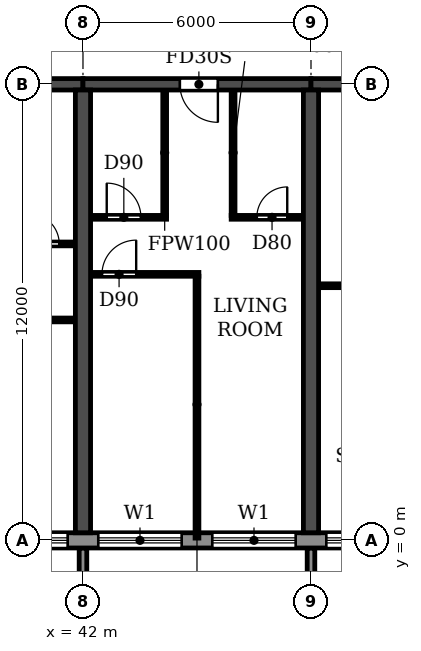
"""IFC4 building model, lengths in metres.
Left out: names, types, materials, properties, quantities, classifications, styles, units other than length and angle.
Written with IfcOpenShell. Run it as: python <this file> out.ifc"""

import sys

from ifc_helpers import new_model, si_unit, direction, frame, frame_2d, origin, place, context, subcontext, project, spatial, polyline, rectangle, outline, extrude, source, transform, mapped, element, fill, save


model = new_model("IFC4")
c1 = context("Model", 3, precision=1e-05, world=origin(), true_north=direction((0.0, 1.0)))
c2 = subcontext(c1, "Body", "Model", "MODEL_VIEW")
j1 = project(units=[si_unit("LENGTHUNIT", "METRE"), si_unit("PLANEANGLEUNIT", "RADIAN")], contexts=[c1])
p1 = place(None, origin())
s1 = spatial("IfcSite", under=j1, at=p1, CompositionType="ELEMENT")
p2 = place(p1, origin())
s2 = spatial("IfcBuilding", under=s1, at=p2, CompositionType="ELEMENT")
p3 = place(p2, frame((0.0, 0.0, 63.0)))
s3 = spatial("IfcBuildingStorey", under=s2, at=p3, CompositionType="ELEMENT", Elevation=63.0)
for number, where, z_axis, x_axis in (
    (1, (42.0, 0.2, 0.0), (0.0, 0.0, 1.0), (0.0, 1.0, 0.0)),
    (2, (48.0, 0.2, 0.0), (0.0, 0.0, 1.0), (0.0, 1.0, 0.0)),
):
    element("IfcWall", number, at=place(p3, frame(where, z_axis=z_axis, x_axis=x_axis)), inside=s3, PredefinedType="SHEAR", context=c2, shape_type="SweptSolid", body=[
        extrude(rectangle(XDim=11.65, YDim=0.4, at=frame_2d((5.825, 0.0))), origin(), (0.0, 0.0, 1.0), 2.95),
    ])
p4 = place(p3, frame((36.0, 12.0, 0.0), z_axis=(0.0, 0.0, 1.0), x_axis=(1.0, 0.0, 0.0)))
e3 = element("IfcWall", 3, at=p4, inside=s3, PredefinedType="SHEAR", context=c2, shape_type="SweptSolid", body=[
    extrude(rectangle(XDim=6.0, YDim=0.3, at=frame_2d((3.0, 0.0))), origin(), (0.0, 0.0, 1.0), 2.35),
])
p5 = place(p4, frame((2.55, 0.0, 0.0)))
e4 = element("IfcOpeningElement", 4, at=p5, cuts=e3, PredefinedType="OPENING", context=c2, shape_type="SweptSolid", body=[
    extrude(rectangle(XDim=1.0, YDim=2.1, at=frame_2d((0.5, 1.05))), frame((0.0, 0.16, 0.0), z_axis=(0.0, -1.0, 0.0), x_axis=(1.0, 0.0, 0.0)), (0.0, 0.0, 1.0), 0.32),
])
p6 = place(p3, frame((42.0, 12.0, 0.0), z_axis=(0.0, 0.0, 1.0), x_axis=(1.0, 0.0, 0.0)))
e5 = element("IfcWall", 5, at=p6, inside=s3, PredefinedType="SHEAR", context=c2, shape_type="SweptSolid", body=[
    extrude(rectangle(XDim=6.0, YDim=0.3, at=frame_2d((3.0, 0.0))), origin(), (0.0, 0.0, 1.0), 2.35),
])
p7 = place(p6, frame((2.55, 0.0, 0.0)))
e6 = element("IfcOpeningElement", 6, at=p7, cuts=e5, PredefinedType="OPENING", context=c2, shape_type="SweptSolid", body=[
    extrude(rectangle(XDim=1.0, YDim=2.1, at=frame_2d((0.5, 1.05))), frame((0.0, 0.16, 0.0), z_axis=(0.0, -1.0, 0.0), x_axis=(1.0, 0.0, 0.0)), (0.0, 0.0, 1.0), 0.32),
])
p8 = place(p3, frame((48.0, 12.0, 0.0), z_axis=(0.0, 0.0, 1.0), x_axis=(1.0, 0.0, 0.0)))
e7 = element("IfcWall", 7, at=p8, inside=s3, PredefinedType="SHEAR", context=c2, shape_type="SweptSolid", body=[
    extrude(rectangle(XDim=6.0, YDim=0.3, at=frame_2d((3.0, 0.0))), origin(), (0.0, 0.0, 1.0), 2.35),
])
p9 = place(p8, frame((2.45, 0.0, 0.0)))
e8 = element("IfcOpeningElement", 8, at=p9, cuts=e7, PredefinedType="OPENING", context=c2, shape_type="SweptSolid", body=[
    extrude(rectangle(XDim=1.0, YDim=2.1, at=frame_2d((0.5, 1.05))), frame((0.0, 0.16, 0.0), z_axis=(0.0, -1.0, 0.0), x_axis=(1.0, 0.0, 0.0)), (0.0, 0.0, 1.0), 0.32),
])
p10 = place(p3, frame((10.683, 0.0, 0.0), z_axis=(0.0, 0.0, 1.0), x_axis=(1.0, 0.0, 0.0)))
e9 = element("IfcWall", 9, at=p10, inside=s3, PredefinedType="STANDARD", context=c2, shape_type="SweptSolid", body=[
    extrude(rectangle(XDim=80.634, YDim=0.4, at=frame_2d((40.317, 0.0))), origin(), (0.0, 0.0, 1.0), 2.95),
])
p11 = place(p10, frame((1.717, 0.0, 0.9)))
e10 = element("IfcOpeningElement", 10, at=p11, cuts=e9, PredefinedType="OPENING", context=c2, shape_type="SweptSolid", body=[
    extrude(rectangle(XDim=2.2, YDim=1.5, at=frame_2d((1.1, 0.75))), frame((0.0, 0.21, 0.0), z_axis=(0.0, -1.0, 0.0), x_axis=(1.0, 0.0, 0.0)), (0.0, 0.0, 1.0), 0.42),
])
p12 = place(p10, frame((4.917, 0.0, 0.0)))
e11 = element("IfcOpeningElement", 11, at=p12, cuts=e9, PredefinedType="OPENING", context=c2, shape_type="SweptSolid", body=[
    extrude(rectangle(XDim=1.8, YDim=2.4, at=frame_2d((0.9, 1.2))), frame((0.0, 0.21, 0.0), z_axis=(0.0, -1.0, 0.0), x_axis=(1.0, 0.0, 0.0)), (0.0, 0.0, 1.0), 0.42),
])
p13 = place(p10, frame((7.717, 0.0, 0.9)))
e12 = element("IfcOpeningElement", 12, at=p13, cuts=e9, PredefinedType="OPENING", context=c2, shape_type="SweptSolid", body=[
    extrude(rectangle(XDim=2.2, YDim=1.5, at=frame_2d((1.1, 0.75))), frame((0.0, 0.21, 0.0), z_axis=(0.0, -1.0, 0.0), x_axis=(1.0, 0.0, 0.0)), (0.0, 0.0, 1.0), 0.42),
])
p14 = place(p10, frame((10.717, 0.0, 0.9)))
e13 = element("IfcOpeningElement", 13, at=p14, cuts=e9, PredefinedType="OPENING", context=c2, shape_type="SweptSolid", body=[
    extrude(rectangle(XDim=2.2, YDim=1.5, at=frame_2d((1.1, 0.75))), frame((0.0, 0.21, 0.0), z_axis=(0.0, -1.0, 0.0), x_axis=(1.0, 0.0, 0.0)), (0.0, 0.0, 1.0), 0.42),
])
p15 = place(p10, frame((13.717, 0.0, 0.9)))
e14 = element("IfcOpeningElement", 14, at=p15, cuts=e9, PredefinedType="OPENING", context=c2, shape_type="SweptSolid", body=[
    extrude(rectangle(XDim=2.2, YDim=1.5, at=frame_2d((1.1, 0.75))), frame((0.0, 0.21, 0.0), z_axis=(0.0, -1.0, 0.0), x_axis=(1.0, 0.0, 0.0)), (0.0, 0.0, 1.0), 0.42),
])
p16 = place(p10, frame((16.917, 0.0, 0.0)))
e15 = element("IfcOpeningElement", 15, at=p16, cuts=e9, PredefinedType="OPENING", context=c2, shape_type="SweptSolid", body=[
    extrude(rectangle(XDim=1.8, YDim=2.4, at=frame_2d((0.9, 1.2))), frame((0.0, 0.21, 0.0), z_axis=(0.0, -1.0, 0.0), x_axis=(1.0, 0.0, 0.0)), (0.0, 0.0, 1.0), 0.42),
])
p17 = place(p10, frame((19.717, 0.0, 0.9)))
e16 = element("IfcOpeningElement", 16, at=p17, cuts=e9, PredefinedType="OPENING", context=c2, shape_type="SweptSolid", body=[
    extrude(rectangle(XDim=2.2, YDim=1.5, at=frame_2d((1.1, 0.75))), frame((0.0, 0.21, 0.0), z_axis=(0.0, -1.0, 0.0), x_axis=(1.0, 0.0, 0.0)), (0.0, 0.0, 1.0), 0.42),
])
p18 = place(p10, frame((22.717, 0.0, 0.9)))
e17 = element("IfcOpeningElement", 17, at=p18, cuts=e9, PredefinedType="OPENING", context=c2, shape_type="SweptSolid", body=[
    extrude(rectangle(XDim=2.2, YDim=1.5, at=frame_2d((1.1, 0.75))), frame((0.0, 0.21, 0.0), z_axis=(0.0, -1.0, 0.0), x_axis=(1.0, 0.0, 0.0)), (0.0, 0.0, 1.0), 0.42),
])
p19 = place(p10, frame((25.917, 0.0, 0.0)))
e18 = element("IfcOpeningElement", 18, at=p19, cuts=e9, PredefinedType="OPENING", context=c2, shape_type="SweptSolid", body=[
    extrude(rectangle(XDim=1.8, YDim=2.4, at=frame_2d((0.9, 1.2))), frame((0.0, 0.21, 0.0), z_axis=(0.0, -1.0, 0.0), x_axis=(1.0, 0.0, 0.0)), (0.0, 0.0, 1.0), 0.42),
])
p20 = place(p10, frame((28.717, 0.0, 0.9)))
e19 = element("IfcOpeningElement", 19, at=p20, cuts=e9, PredefinedType="OPENING", context=c2, shape_type="SweptSolid", body=[
    extrude(rectangle(XDim=2.2, YDim=1.5, at=frame_2d((1.1, 0.75))), frame((0.0, 0.21, 0.0), z_axis=(0.0, -1.0, 0.0), x_axis=(1.0, 0.0, 0.0)), (0.0, 0.0, 1.0), 0.42),
])
p21 = place(p10, frame((31.717, 0.0, 0.9)))
e20 = element("IfcOpeningElement", 20, at=p21, cuts=e9, PredefinedType="OPENING", context=c2, shape_type="SweptSolid", body=[
    extrude(rectangle(XDim=2.2, YDim=1.5, at=frame_2d((1.1, 0.75))), frame((0.0, 0.21, 0.0), z_axis=(0.0, -1.0, 0.0), x_axis=(1.0, 0.0, 0.0)), (0.0, 0.0, 1.0), 0.42),
])
p22 = place(p10, frame((34.717, 0.0, 0.9)))
e21 = element("IfcOpeningElement", 21, at=p22, cuts=e9, PredefinedType="OPENING", context=c2, shape_type="SweptSolid", body=[
    extrude(rectangle(XDim=2.2, YDim=1.5, at=frame_2d((1.1, 0.75))), frame((0.0, 0.21, 0.0), z_axis=(0.0, -1.0, 0.0), x_axis=(1.0, 0.0, 0.0)), (0.0, 0.0, 1.0), 0.42),
])
p23 = place(p10, frame((37.717, 0.0, 0.9)))
e22 = element("IfcOpeningElement", 22, at=p23, cuts=e9, PredefinedType="OPENING", context=c2, shape_type="SweptSolid", body=[
    extrude(rectangle(XDim=2.2, YDim=1.5, at=frame_2d((1.1, 0.75))), frame((0.0, 0.21, 0.0), z_axis=(0.0, -1.0, 0.0), x_axis=(1.0, 0.0, 0.0)), (0.0, 0.0, 1.0), 0.42),
])
p24 = place(p10, frame((40.917, 0.0, 0.0)))
e23 = element("IfcOpeningElement", 23, at=p24, cuts=e9, PredefinedType="OPENING", context=c2, shape_type="SweptSolid", body=[
    extrude(rectangle(XDim=1.8, YDim=2.4, at=frame_2d((0.9, 1.2))), frame((0.0, 0.21, 0.0), z_axis=(0.0, -1.0, 0.0), x_axis=(1.0, 0.0, 0.0)), (0.0, 0.0, 1.0), 0.42),
])
p25 = place(p10, frame((43.717, 0.0, 0.9)))
e24 = element("IfcOpeningElement", 24, at=p25, cuts=e9, PredefinedType="OPENING", context=c2, shape_type="SweptSolid", body=[
    extrude(rectangle(XDim=2.2, YDim=1.5, at=frame_2d((1.1, 0.75))), frame((0.0, 0.21, 0.0), z_axis=(0.0, -1.0, 0.0), x_axis=(1.0, 0.0, 0.0)), (0.0, 0.0, 1.0), 0.42),
])
p26 = place(p10, frame((46.717, 0.0, 0.9)))
e25 = element("IfcOpeningElement", 25, at=p26, cuts=e9, PredefinedType="OPENING", context=c2, shape_type="SweptSolid", body=[
    extrude(rectangle(XDim=2.2, YDim=1.5, at=frame_2d((1.1, 0.75))), frame((0.0, 0.21, 0.0), z_axis=(0.0, -1.0, 0.0), x_axis=(1.0, 0.0, 0.0)), (0.0, 0.0, 1.0), 0.42),
])
p27 = place(p10, frame((49.717, 0.0, 0.9)))
e26 = element("IfcOpeningElement", 26, at=p27, cuts=e9, PredefinedType="OPENING", context=c2, shape_type="SweptSolid", body=[
    extrude(rectangle(XDim=2.2, YDim=1.5, at=frame_2d((1.1, 0.75))), frame((0.0, 0.21, 0.0), z_axis=(0.0, -1.0, 0.0), x_axis=(1.0, 0.0, 0.0)), (0.0, 0.0, 1.0), 0.42),
])
p28 = place(p10, frame((52.717, 0.0, 0.9)))
e27 = element("IfcOpeningElement", 27, at=p28, cuts=e9, PredefinedType="OPENING", context=c2, shape_type="SweptSolid", body=[
    extrude(rectangle(XDim=2.2, YDim=1.5, at=frame_2d((1.1, 0.75))), frame((0.0, 0.21, 0.0), z_axis=(0.0, -1.0, 0.0), x_axis=(1.0, 0.0, 0.0)), (0.0, 0.0, 1.0), 0.42),
])
p29 = place(p10, frame((55.717, 0.0, 0.9)))
e28 = element("IfcOpeningElement", 28, at=p29, cuts=e9, PredefinedType="OPENING", context=c2, shape_type="SweptSolid", body=[
    extrude(rectangle(XDim=2.2, YDim=1.5, at=frame_2d((1.1, 0.75))), frame((0.0, 0.21, 0.0), z_axis=(0.0, -1.0, 0.0), x_axis=(1.0, 0.0, 0.0)), (0.0, 0.0, 1.0), 0.42),
])
p30 = place(p10, frame((58.717, 0.0, 0.9)))
e29 = element("IfcOpeningElement", 29, at=p30, cuts=e9, PredefinedType="OPENING", context=c2, shape_type="SweptSolid", body=[
    extrude(rectangle(XDim=2.2, YDim=1.5, at=frame_2d((1.1, 0.75))), frame((0.0, 0.21, 0.0), z_axis=(0.0, -1.0, 0.0), x_axis=(1.0, 0.0, 0.0)), (0.0, 0.0, 1.0), 0.42),
])
p31 = place(p10, frame((61.717, 0.0, 0.9)))
e30 = element("IfcOpeningElement", 30, at=p31, cuts=e9, PredefinedType="OPENING", context=c2, shape_type="SweptSolid", body=[
    extrude(rectangle(XDim=2.2, YDim=1.5, at=frame_2d((1.1, 0.75))), frame((0.0, 0.21, 0.0), z_axis=(0.0, -1.0, 0.0), x_axis=(1.0, 0.0, 0.0)), (0.0, 0.0, 1.0), 0.42),
])
p32 = place(p10, frame((64.917, 0.0, 0.0)))
e31 = element("IfcOpeningElement", 31, at=p32, cuts=e9, PredefinedType="OPENING", context=c2, shape_type="SweptSolid", body=[
    extrude(rectangle(XDim=1.8, YDim=2.4, at=frame_2d((0.9, 1.2))), frame((0.0, 0.21, 0.0), z_axis=(0.0, -1.0, 0.0), x_axis=(1.0, 0.0, 0.0)), (0.0, 0.0, 1.0), 0.42),
])
p33 = place(p10, frame((67.717, 0.0, 0.9)))
e32 = element("IfcOpeningElement", 32, at=p33, cuts=e9, PredefinedType="OPENING", context=c2, shape_type="SweptSolid", body=[
    extrude(rectangle(XDim=2.2, YDim=1.5, at=frame_2d((1.1, 0.75))), frame((0.0, 0.21, 0.0), z_axis=(0.0, -1.0, 0.0), x_axis=(1.0, 0.0, 0.0)), (0.0, 0.0, 1.0), 0.42),
])
p34 = place(p10, frame((70.717, 0.0, 0.9)))
e33 = element("IfcOpeningElement", 33, at=p34, cuts=e9, PredefinedType="OPENING", context=c2, shape_type="SweptSolid", body=[
    extrude(rectangle(XDim=2.2, YDim=1.5, at=frame_2d((1.1, 0.75))), frame((0.0, 0.21, 0.0), z_axis=(0.0, -1.0, 0.0), x_axis=(1.0, 0.0, 0.0)), (0.0, 0.0, 1.0), 0.42),
])
p35 = place(p10, frame((73.717, 0.0, 0.9)))
e34 = element("IfcOpeningElement", 34, at=p35, cuts=e9, PredefinedType="OPENING", context=c2, shape_type="SweptSolid", body=[
    extrude(rectangle(XDim=2.2, YDim=1.5, at=frame_2d((1.1, 0.75))), frame((0.0, 0.21, 0.0), z_axis=(0.0, -1.0, 0.0), x_axis=(1.0, 0.0, 0.0)), (0.0, 0.0, 1.0), 0.42),
])
p36 = place(p10, frame((76.917, 0.0, 0.0)))
e35 = element("IfcOpeningElement", 35, at=p36, cuts=e9, PredefinedType="OPENING", context=c2, shape_type="SweptSolid", body=[
    extrude(rectangle(XDim=1.8, YDim=2.4, at=frame_2d((0.9, 1.2))), frame((0.0, 0.21, 0.0), z_axis=(0.0, -1.0, 0.0), x_axis=(1.0, 0.0, 0.0)), (0.0, 0.0, 1.0), 0.42),
])
m1 = source(origin(), c2, "Body", "SweptSolid", [
    extrude(outline(polyline([(0.0, 0.0), (0.2, 0.0), (0.2, 1.65), (0.0, 1.65), (0.0, 0.0)])), origin(), (0.0, 0.0, 1.0), 3.1),
])
for number, where in (
    (36, (41.9, -1.85, 0.0)),
    (37, (47.9, -1.85, 0.0)),
):
    element("IfcWall", number, at=place(p3, frame(where)), inside=s3, PredefinedType="STANDARD", context=c2, shape_type="MappedRepresentation", body=[
        mapped(m1, transform((0.0, 0.0, 0.0))),
    ])
p37 = place(p3, frame((38.95, 5.8, 0.0), z_axis=(0.0, 0.0, 1.0), x_axis=(1.0, 0.0, 0.0)))
e38 = element("IfcWall", 38, at=p37, inside=s3, PredefinedType="PARTITIONING", context=c2, shape_type="SweptSolid", body=[
    extrude(rectangle(XDim=2.84, YDim=0.1, at=frame_2d((1.42, 0.0))), origin(), (0.0, 0.0, 1.0), 2.95),
])
p38 = place(p37, frame((0.55, 0.0, 0.0)))
e39 = element("IfcOpeningElement", 39, at=p38, cuts=e38, PredefinedType="OPENING", context=c2, shape_type="SweptSolid", body=[
    extrude(rectangle(XDim=0.9, YDim=2.1, at=frame_2d((0.45, 1.05))), frame((0.0, 0.06, 0.0), z_axis=(0.0, -1.0, 0.0), x_axis=(1.0, 0.0, 0.0)), (0.0, 0.0, 1.0), 0.12),
])
p39 = place(p3, frame((48.21, 6.7, 0.0), z_axis=(0.0, 0.0, 1.0), x_axis=(1.0, 0.0, 0.0)))
e40 = element("IfcWall", 40, at=p39, inside=s3, PredefinedType="PARTITIONING", context=c2, shape_type="SweptSolid", body=[
    extrude(rectangle(XDim=1.89, YDim=0.1, at=frame_2d((0.945, 0.0))), origin(), (0.0, 0.0, 1.0), 2.95),
])
p40 = place(p3, frame((42.21, 7.0, 0.0), z_axis=(0.0, 0.0, 1.0), x_axis=(1.0, 0.0, 0.0)))
e41 = element("IfcWall", 41, at=p40, inside=s3, PredefinedType="PARTITIONING", context=c2, shape_type="SweptSolid", body=[
    extrude(rectangle(XDim=2.84, YDim=0.1, at=frame_2d((1.42, 0.0))), origin(), (0.0, 0.0, 1.0), 2.95),
])
p41 = place(p40, frame((0.29, 0.0, 0.0)))
e42 = element("IfcOpeningElement", 42, at=p41, cuts=e41, PredefinedType="OPENING", context=c2, shape_type="SweptSolid", body=[
    extrude(rectangle(XDim=0.9, YDim=2.1, at=frame_2d((0.45, 1.05))), frame((0.0, 0.06, 0.0), z_axis=(0.0, -1.0, 0.0), x_axis=(1.0, 0.0, 0.0)), (0.0, 0.0, 1.0), 0.12),
])
p42 = place(p3, frame((39.9, 7.8, 0.0), z_axis=(0.0, 0.0, 1.0), x_axis=(1.0, 0.0, 0.0)))
e43 = element("IfcWall", 43, at=p42, inside=s3, PredefinedType="PARTITIONING", context=c2, shape_type="SweptSolid", body=[
    extrude(rectangle(XDim=1.89, YDim=0.1, at=frame_2d((0.945, 0.0))), origin(), (0.0, 0.0, 1.0), 2.95),
])
p43 = place(p42, frame((0.675, 0.0, 0.0)))
e44 = element("IfcOpeningElement", 44, at=p43, cuts=e43, PredefinedType="OPENING", context=c2, shape_type="SweptSolid", body=[
    extrude(rectangle(XDim=0.8, YDim=2.1, at=frame_2d((0.4, 1.05))), frame((0.0, 0.06, 0.0), z_axis=(0.0, -1.0, 0.0), x_axis=(1.0, 0.0, 0.0)), (0.0, 0.0, 1.0), 0.12),
])
p44 = place(p3, frame((42.21, 8.5, 0.0), z_axis=(0.0, 0.0, 1.0), x_axis=(1.0, 0.0, 0.0)))
e45 = element("IfcWall", 45, at=p44, inside=s3, PredefinedType="PARTITIONING", context=c2, shape_type="SweptSolid", body=[
    extrude(rectangle(XDim=1.99, YDim=0.1, at=frame_2d((0.995, 0.0))), origin(), (0.0, 0.0, 1.0), 2.95),
])
p45 = place(p44, frame((0.415, 0.0, 0.0)))
e46 = element("IfcOpeningElement", 46, at=p45, cuts=e45, PredefinedType="OPENING", context=c2, shape_type="SweptSolid", body=[
    extrude(rectangle(XDim=0.9, YDim=2.1, at=frame_2d((0.45, 1.05))), frame((0.0, 0.06, 0.0), z_axis=(0.0, -1.0, 0.0), x_axis=(1.0, 0.0, 0.0)), (0.0, 0.0, 1.0), 0.12),
])
p46 = place(p3, frame((45.9, 8.5, 0.0), z_axis=(0.0, 0.0, 1.0), x_axis=(1.0, 0.0, 0.0)))
e47 = element("IfcWall", 47, at=p46, inside=s3, PredefinedType="PARTITIONING", context=c2, shape_type="SweptSolid", body=[
    extrude(rectangle(XDim=1.89, YDim=0.1, at=frame_2d((0.945, 0.0))), origin(), (0.0, 0.0, 1.0), 2.95),
])
p47 = place(p46, frame((0.675, 0.0, 0.0)))
e48 = element("IfcOpeningElement", 48, at=p47, cuts=e47, PredefinedType="OPENING", context=c2, shape_type="SweptSolid", body=[
    extrude(rectangle(XDim=0.8, YDim=2.1, at=frame_2d((0.4, 1.05))), frame((0.0, 0.06, 0.0), z_axis=(0.0, -1.0, 0.0), x_axis=(1.0, 0.0, 0.0)), (0.0, 0.0, 1.0), 0.12),
])
p48 = place(p3, frame((44.15, 8.55, 0.0), z_axis=(0.0, 0.0, 1.0), x_axis=(0.0, 1.0, 0.0)))
e49 = element("IfcWall", 49, at=p48, inside=s3, PredefinedType="PARTITIONING", context=c2, shape_type="SweptSolid", body=[
    extrude(rectangle(XDim=3.29, YDim=0.1, at=frame_2d((1.645, 0.0))), origin(), (0.0, 0.0, 1.0), 2.95),
])
p49 = place(p3, frame((45.0, 0.06, 0.0), z_axis=(0.0, 0.0, 1.0), x_axis=(0.0, 1.0, 0.0)))
e50 = element("IfcWall", 50, at=p49, inside=s3, PredefinedType="PARTITIONING", context=c2, shape_type="SweptSolid", body=[
    extrude(rectangle(XDim=6.89, YDim=0.1, at=frame_2d((3.445, 0.0))), origin(), (0.0, 0.0, 1.0), 2.95),
])
p50 = place(p3, frame((45.95, 8.55, 0.0), z_axis=(0.0, 0.0, 1.0), x_axis=(0.0, 1.0, 0.0)))
e51 = element("IfcWall", 51, at=p50, inside=s3, PredefinedType="PARTITIONING", context=c2, shape_type="SweptSolid", body=[
    extrude(rectangle(XDim=3.29, YDim=0.1, at=frame_2d((1.645, 0.0))), origin(), (0.0, 0.0, 1.0), 2.95),
])
p51 = place(p20, origin())
e52 = element("IfcWindow", 52, at=p51, inside=s3, PartitioningType="DOUBLE_PANEL_HORIZONTAL", PredefinedType="WINDOW", context=c2, shape_type="SweptSolid", body=[
    extrude(rectangle(XDim=2.2, YDim=1.5, at=frame_2d((1.1, 0.75))), frame((0.0, 0.03, 0.0), z_axis=(0.0, -1.0, 0.0), x_axis=(1.0, 0.0, 0.0)), (0.0, 0.0, 1.0), 0.06),
])
fill(e19, e52)
p52 = place(p21, origin())
e53 = element("IfcWindow", 53, at=p52, inside=s3, PartitioningType="DOUBLE_PANEL_HORIZONTAL", PredefinedType="WINDOW", context=c2, shape_type="SweptSolid", body=[
    extrude(rectangle(XDim=2.2, YDim=1.5, at=frame_2d((1.1, 0.75))), frame((0.0, 0.03, 0.0), z_axis=(0.0, -1.0, 0.0), x_axis=(1.0, 0.0, 0.0)), (0.0, 0.0, 1.0), 0.06),
])
fill(e20, e53)
p53 = place(p22, origin())
e54 = element("IfcWindow", 54, at=p53, inside=s3, PartitioningType="DOUBLE_PANEL_HORIZONTAL", PredefinedType="WINDOW", context=c2, shape_type="SweptSolid", body=[
    extrude(rectangle(XDim=2.2, YDim=1.5, at=frame_2d((1.1, 0.75))), frame((0.0, 0.03, 0.0), z_axis=(0.0, -1.0, 0.0), x_axis=(1.0, 0.0, 0.0)), (0.0, 0.0, 1.0), 0.06),
])
fill(e21, e54)
p54 = place(p23, origin())
e55 = element("IfcWindow", 55, at=p54, inside=s3, PartitioningType="DOUBLE_PANEL_HORIZONTAL", PredefinedType="WINDOW", context=c2, shape_type="SweptSolid", body=[
    extrude(rectangle(XDim=2.2, YDim=1.5, at=frame_2d((1.1, 0.75))), frame((0.0, 0.03, 0.0), z_axis=(0.0, -1.0, 0.0), x_axis=(1.0, 0.0, 0.0)), (0.0, 0.0, 1.0), 0.06),
])
fill(e22, e55)
p55 = place(p43, origin())
e56 = element("IfcDoor", 56, at=p55, inside=s3, OperationType="SINGLE_SWING_LEFT", PredefinedType="DOOR", context=c2, shape_type="SweptSolid", body=[
    extrude(rectangle(XDim=0.8, YDim=2.1, at=frame_2d((0.4, 1.05))), frame((0.0, 0.025, 0.0), z_axis=(0.0, -1.0, 0.0), x_axis=(1.0, 0.0, 0.0)), (0.0, 0.0, 1.0), 0.05),
])
fill(e44, e56)
p56 = place(p41, origin())
e57 = element("IfcDoor", 57, at=p56, inside=s3, OperationType="SINGLE_SWING_RIGHT", PredefinedType="DOOR", context=c2, shape_type="SweptSolid", body=[
    extrude(rectangle(XDim=0.9, YDim=2.1, at=frame_2d((0.45, 1.05))), frame((0.0, 0.025, 0.0), z_axis=(0.0, -1.0, 0.0), x_axis=(1.0, 0.0, 0.0)), (0.0, 0.0, 1.0), 0.05),
])
fill(e42, e57)
p57 = place(p45, origin())
e58 = element("IfcDoor", 58, at=p57, inside=s3, OperationType="SINGLE_SWING_LEFT", PredefinedType="DOOR", context=c2, shape_type="SweptSolid", body=[
    extrude(rectangle(XDim=0.9, YDim=2.1, at=frame_2d((0.45, 1.05))), frame((0.0, 0.025, 0.0), z_axis=(0.0, -1.0, 0.0), x_axis=(1.0, 0.0, 0.0)), (0.0, 0.0, 1.0), 0.05),
])
fill(e46, e58)
p58 = place(p7, frame((1.0, 0.0, 0.0), z_axis=(0.0, 0.0, 1.0), x_axis=(-1.0, 0.0, 0.0)))
e59 = element("IfcDoor", 59, at=p58, inside=s3, OperationType="SINGLE_SWING_LEFT", PredefinedType="DOOR", context=c2, shape_type="SweptSolid", body=[
    extrude(rectangle(XDim=1.0, YDim=2.1, at=frame_2d((0.5, 1.05))), frame((0.0, 0.025, 0.0), z_axis=(0.0, -1.0, 0.0), x_axis=(1.0, 0.0, 0.0)), (0.0, 0.0, 1.0), 0.05),
])
fill(e6, e59)
p59 = place(p47, origin())
e60 = element("IfcDoor", 60, at=p59, inside=s3, OperationType="SINGLE_SWING_RIGHT", PredefinedType="DOOR", context=c2, shape_type="SweptSolid", body=[
    extrude(rectangle(XDim=0.8, YDim=2.1, at=frame_2d((0.4, 1.05))), frame((0.0, 0.025, 0.0), z_axis=(0.0, -1.0, 0.0), x_axis=(1.0, 0.0, 0.0)), (0.0, 0.0, 1.0), 0.05),
])
fill(e48, e60)
save(model, sys.argv[1])
